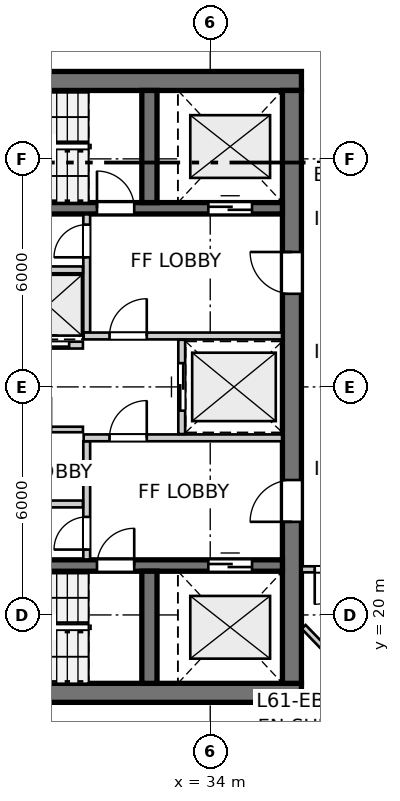
"""IFC4 building model, lengths in metres.
Left out: names, types, materials, properties, quantities, classifications, styles, units other than length and angle.
Written with IfcOpenShell. Run it as: python <this file> out.ifc"""

import sys

from ifc_helpers import new_model, si_unit, direction, frame, frame_2d, origin, place, context, subcontext, project, spatial, rectangle, extrude, source, transform, mapped, element, fill, save


model = new_model("IFC4")
c1 = context("Model", 3, precision=1e-05, world=origin(), true_north=direction((0.0, 1.0)))
c2 = subcontext(c1, "Body", "Model", "MODEL_VIEW")
j1 = project(units=[si_unit("LENGTHUNIT", "METRE"), si_unit("PLANEANGLEUNIT", "RADIAN")], contexts=[c1])
p1 = place(None, origin())
s1 = spatial("IfcSite", under=j1, at=p1, CompositionType="ELEMENT")
p2 = place(p1, origin())
s2 = spatial("IfcBuilding", under=s1, at=p2, CompositionType="ELEMENT")
p3 = place(p2, frame((0.0, 0.0, 205.2)))
s3 = spatial("IfcBuildingStorey", under=s2, at=p3, CompositionType="ELEMENT", Elevation=205.2)
for number, where, z_axis, x_axis in (
    (1, (24.3, 17.95, 0.0), (0.0, 0.0, 1.0), (1.0, 0.0, 0.0)),
    (2, (36.4, 34.05, 0.0), (0.0, 0.0, 1.0), (-1.0, 0.0, 0.0)),
):
    element("IfcWall", number, at=place(p3, frame(where, z_axis=z_axis, x_axis=x_axis)), inside=s3, PredefinedType="SHEAR", context=c2, shape_type="SweptSolid", body=[
        extrude(rectangle(XDim=12.1, YDim=0.5, at=frame_2d((6.05, 0.0))), origin(), (0.0, 0.0, 1.0), 2.935),
    ])
p4 = place(p3, frame((36.15, 18.2, 0.0), z_axis=(0.0, 0.0, 1.0), x_axis=(0.0, 1.0, 0.0)))
e3 = element("IfcWall", 3, at=p4, inside=s3, PredefinedType="SHEAR", context=c2, shape_type="SweptSolid", body=[
    extrude(rectangle(XDim=15.6, YDim=0.5, at=frame_2d((7.8, 0.0))), origin(), (0.0, 0.0, 1.0), 2.935),
])
p5 = place(p4, frame((4.25, 0.0, 0.0)))
e4 = element("IfcOpeningElement", 4, at=p5, cuts=e3, PredefinedType="OPENING", context=c2, shape_type="SweptSolid", body=[
    extrude(rectangle(XDim=1.1, YDim=2.15, at=frame_2d((0.55, 1.075))), frame((0.0, 0.26, 0.0), z_axis=(0.0, -1.0, 0.0), x_axis=(1.0, 0.0, 0.0)), (0.0, 0.0, 1.0), 0.52),
])
p6 = place(p4, frame((10.25, 0.0, 0.0)))
e5 = element("IfcOpeningElement", 5, at=p6, cuts=e3, PredefinedType="OPENING", context=c2, shape_type="SweptSolid", body=[
    extrude(rectangle(XDim=1.1, YDim=2.15, at=frame_2d((0.55, 1.075))), frame((0.0, 0.26, 0.0), z_axis=(0.0, -1.0, 0.0), x_axis=(1.0, 0.0, 0.0)), (0.0, 0.0, 1.0), 0.52),
])
p7 = place(p3, frame((24.8, 21.3, 0.0), z_axis=(0.0, 0.0, 1.0), x_axis=(1.0, 0.0, 0.0)))
e6 = element("IfcWall", 6, at=p7, inside=s3, PredefinedType="SHEAR", context=c2, shape_type="SweptSolid", body=[
    extrude(rectangle(XDim=11.1, YDim=0.3, at=frame_2d((5.55, 0.0))), origin(), (0.0, 0.0, 1.0), 2.935),
])
p8 = place(p7, frame((6.22, 0.0, 0.0)))
e7 = element("IfcOpeningElement", 7, at=p8, cuts=e6, PredefinedType="OPENING", context=c2, shape_type="SweptSolid", body=[
    extrude(rectangle(XDim=0.98, YDim=2.15, at=frame_2d((0.49, 1.075))), frame((0.0, 0.16, 0.0), z_axis=(0.0, -1.0, 0.0), x_axis=(1.0, 0.0, 0.0)), (0.0, 0.0, 1.0), 0.32),
])
p9 = place(p7, frame((9.15, 0.0, 0.0)))
e8 = element("IfcOpeningElement", 8, at=p9, cuts=e6, PredefinedType="OPENING", context=c2, shape_type="SweptSolid", body=[
    extrude(rectangle(XDim=1.15, YDim=2.15, at=frame_2d((0.575, 1.075))), frame((0.0, 0.16, 0.0), z_axis=(0.0, -1.0, 0.0), x_axis=(1.0, 0.0, 0.0)), (0.0, 0.0, 1.0), 0.32),
])
p10 = place(p3, frame((32.4, 18.2, 0.0), z_axis=(0.0, 0.0, 1.0), x_axis=(0.0, 1.0, 0.0)))
e9 = element("IfcWall", 9, at=p10, inside=s3, PredefinedType="SHEAR", context=c2, shape_type="SweptSolid", body=[
    extrude(rectangle(XDim=2.95, YDim=0.4, at=frame_2d((1.475, 0.0))), origin(), (0.0, 0.0, 1.0), 2.935),
])
p11 = place(p3, frame((24.8, 30.7, 0.0), z_axis=(0.0, 0.0, 1.0), x_axis=(1.0, 0.0, 0.0)))
e10 = element("IfcWall", 10, at=p11, inside=s3, PredefinedType="SHEAR", context=c2, shape_type="SweptSolid", body=[
    extrude(rectangle(XDim=11.1, YDim=0.3, at=frame_2d((5.55, 0.0))), origin(), (0.0, 0.0, 1.0), 2.935),
])
p12 = place(p11, frame((6.22, 0.0, 0.0)))
e11 = element("IfcOpeningElement", 11, at=p12, cuts=e10, PredefinedType="OPENING", context=c2, shape_type="SweptSolid", body=[
    extrude(rectangle(XDim=0.98, YDim=2.15, at=frame_2d((0.49, 1.075))), frame((0.0, 0.16, 0.0), z_axis=(0.0, -1.0, 0.0), x_axis=(1.0, 0.0, 0.0)), (0.0, 0.0, 1.0), 0.32),
])
p13 = place(p11, frame((9.15, 0.0, 0.0)))
e12 = element("IfcOpeningElement", 12, at=p13, cuts=e10, PredefinedType="OPENING", context=c2, shape_type="SweptSolid", body=[
    extrude(rectangle(XDim=1.15, YDim=2.15, at=frame_2d((0.575, 1.075))), frame((0.0, 0.16, 0.0), z_axis=(0.0, -1.0, 0.0), x_axis=(1.0, 0.0, 0.0)), (0.0, 0.0, 1.0), 0.32),
])
p14 = place(p3, frame((32.4, 30.85, 0.0), z_axis=(0.0, 0.0, 1.0), x_axis=(0.0, 1.0, 0.0)))
e13 = element("IfcWall", 13, at=p14, inside=s3, PredefinedType="SHEAR", context=c2, shape_type="SweptSolid", body=[
    extrude(rectangle(XDim=2.95, YDim=0.4, at=frame_2d((1.475, 0.0))), origin(), (0.0, 0.0, 1.0), 2.935),
])
p15 = place(p3, frame((30.75, 21.46, 0.0), z_axis=(0.0, 0.0, 1.0), x_axis=(0.0, 1.0, 0.0)))
e14 = element("IfcWall", 14, at=p15, inside=s3, PredefinedType="PARTITIONING", context=c2, shape_type="SweptSolid", body=[
    extrude(rectangle(XDim=3.11, YDim=0.18, at=frame_2d((1.555, 0.0))), origin(), (0.0, 0.0, 1.0), 2.935),
])
p16 = place(p15, frame((0.26, 0.0, 0.0)))
e15 = element("IfcOpeningElement", 15, at=p16, cuts=e14, PredefinedType="OPENING", context=c2, shape_type="SweptSolid", body=[
    extrude(rectangle(XDim=0.86, YDim=2.05, at=frame_2d((0.43, 1.025))), frame((0.0, 0.1, 0.0), z_axis=(0.0, -1.0, 0.0), x_axis=(1.0, 0.0, 0.0)), (0.0, 0.0, 1.0), 0.2),
])
p17 = place(p3, frame((30.67, 24.66, 0.0), z_axis=(0.0, 0.0, 1.0), x_axis=(1.0, 0.0, 0.0)))
e16 = element("IfcWall", 16, at=p17, inside=s3, PredefinedType="PARTITIONING", context=c2, shape_type="SweptSolid", body=[
    extrude(rectangle(XDim=5.22, YDim=0.18, at=frame_2d((2.61, 0.0))), origin(), (0.0, 0.0, 1.0), 2.935),
])
p18 = place(p17, frame((0.68, 0.0, 0.0)))
e17 = element("IfcOpeningElement", 17, at=p18, cuts=e16, PredefinedType="OPENING", context=c2, shape_type="SweptSolid", body=[
    extrude(rectangle(XDim=0.98, YDim=2.15, at=frame_2d((0.49, 1.075))), frame((0.0, 0.1, 0.0), z_axis=(0.0, -1.0, 0.0), x_axis=(1.0, 0.0, 0.0)), (0.0, 0.0, 1.0), 0.2),
])
p19 = place(p3, frame((30.75, 27.43, 0.0), z_axis=(0.0, 0.0, 1.0), x_axis=(0.0, 1.0, 0.0)))
e18 = element("IfcWall", 18, at=p19, inside=s3, PredefinedType="PARTITIONING", context=c2, shape_type="SweptSolid", body=[
    extrude(rectangle(XDim=3.11, YDim=0.18, at=frame_2d((1.555, 0.0))), origin(), (0.0, 0.0, 1.0), 2.935),
])
p20 = place(p19, frame((1.98, 0.0, 0.0)))
e19 = element("IfcOpeningElement", 19, at=p20, cuts=e18, PredefinedType="OPENING", context=c2, shape_type="SweptSolid", body=[
    extrude(rectangle(XDim=0.86, YDim=2.05, at=frame_2d((0.43, 1.025))), frame((0.0, 0.1, 0.0), z_axis=(0.0, -1.0, 0.0), x_axis=(1.0, 0.0, 0.0)), (0.0, 0.0, 1.0), 0.2),
])
p21 = place(p3, frame((30.67, 27.34, 0.0), z_axis=(0.0, 0.0, 1.0), x_axis=(1.0, 0.0, 0.0)))
e20 = element("IfcWall", 20, at=p21, inside=s3, PredefinedType="PARTITIONING", context=c2, shape_type="SweptSolid", body=[
    extrude(rectangle(XDim=5.22, YDim=0.18, at=frame_2d((2.61, 0.0))), origin(), (0.0, 0.0, 1.0), 2.935),
])
p22 = place(p21, frame((0.68, 0.0, 0.0)))
e21 = element("IfcOpeningElement", 21, at=p22, cuts=e20, PredefinedType="OPENING", context=c2, shape_type="SweptSolid", body=[
    extrude(rectangle(XDim=0.98, YDim=2.15, at=frame_2d((0.49, 1.075))), frame((0.0, 0.1, 0.0), z_axis=(0.0, -1.0, 0.0), x_axis=(1.0, 0.0, 0.0)), (0.0, 0.0, 1.0), 0.2),
])
p23 = place(p3, frame((33.25, 24.76, 0.0), z_axis=(0.0, 0.0, 1.0), x_axis=(0.0, 1.0, 0.0)))
e22 = element("IfcWall", 22, at=p23, inside=s3, PredefinedType="PARTITIONING", context=c2, shape_type="SweptSolid", body=[
    extrude(rectangle(XDim=2.48, YDim=0.18, at=frame_2d((1.24, 0.0))), origin(), (0.0, 0.0, 1.0), 2.935),
])
p24 = place(p23, frame((0.615, 0.0, 0.0)))
e23 = element("IfcOpeningElement", 23, at=p24, cuts=e22, PredefinedType="OPENING", context=c2, shape_type="SweptSolid", body=[
    extrude(rectangle(XDim=1.25, YDim=2.15, at=frame_2d((0.625, 1.075))), frame((0.0, 0.1, 0.0), z_axis=(0.0, -1.0, 0.0), x_axis=(1.0, 0.0, 0.0)), (0.0, 0.0, 1.0), 0.2),
])
p25 = place(p3, frame((24.81, 22.92, 0.0), z_axis=(0.0, 0.0, 1.0), x_axis=(1.0, 0.0, 0.0)))
e24 = element("IfcWall", 24, at=p25, inside=s3, PredefinedType="PARTITIONING", context=c2, shape_type="SweptSolid", body=[
    extrude(rectangle(XDim=5.84, YDim=0.18, at=frame_2d((2.92, 0.0))), origin(), (0.0, 0.0, 1.0), 2.935),
])
p26 = place(p3, frame((28.13, 24.88, 0.0), z_axis=(0.0, 0.0, 1.0), x_axis=(1.0, 0.0, 0.0)))
e25 = element("IfcWall", 25, at=p26, inside=s3, PredefinedType="PARTITIONING", context=c2, shape_type="SweptSolid", body=[
    extrude(rectangle(XDim=2.52, YDim=0.145, at=frame_2d((1.26, 0.0))), origin(), (0.0, 0.0, 1.0), 2.935),
])
p27 = place(p26, frame((0.82, 0.0, 0.0)))
e26 = element("IfcOpeningElement", 26, at=p27, cuts=e25, PredefinedType="OPENING", context=c2, shape_type="SweptSolid", body=[
    extrude(rectangle(XDim=0.86, YDim=2.05, at=frame_2d((0.43, 1.025))), frame((0.0, 0.083, 0.0), z_axis=(0.0, -1.0, 0.0), x_axis=(1.0, 0.0, 0.0)), (0.0, 0.0, 1.0), 0.165),
])
p28 = place(p3, frame((24.81, 29.08, 0.0), z_axis=(0.0, 0.0, 1.0), x_axis=(1.0, 0.0, 0.0)))
e27 = element("IfcWall", 27, at=p28, inside=s3, PredefinedType="PARTITIONING", context=c2, shape_type="SweptSolid", body=[
    extrude(rectangle(XDim=5.84, YDim=0.18, at=frame_2d((2.92, 0.0))), origin(), (0.0, 0.0, 1.0), 2.935),
])
p29 = place(p3, frame((28.825, 27.1, 0.0), z_axis=(0.0, 0.0, 1.0), x_axis=(1.0, 0.0, 0.0)))
e28 = element("IfcWall", 28, at=p29, inside=s3, PredefinedType="PARTITIONING", context=c2, shape_type="SweptSolid", body=[
    extrude(rectangle(XDim=1.825, YDim=0.18, at=frame_2d((0.913, 0.0))), origin(), (0.0, 0.0, 1.0), 2.935),
])
p30 = place(p29, frame((0.363, 0.0, 0.0)))
e29 = element("IfcOpeningElement", 29, at=p30, cuts=e28, PredefinedType="OPENING", context=c2, shape_type="SweptSolid", body=[
    extrude(rectangle(XDim=1.1, YDim=2.15, at=frame_2d((0.55, 1.075))), frame((0.0, 0.1, 0.0), z_axis=(0.0, -1.0, 0.0), x_axis=(1.0, 0.0, 0.0)), (0.0, 0.0, 1.0), 0.2),
])
p31 = place(p3, frame((38.02, 21.2, 0.0), z_axis=(0.0, 0.0, 1.0), x_axis=(-1.0, 0.0, 0.0)))
e30 = element("IfcWall", 30, at=p31, inside=s3, PredefinedType="PARTITIONING", context=c2, shape_type="SweptSolid", body=[
    extrude(rectangle(XDim=1.612, YDim=0.16, at=frame_2d((0.806, 0.0))), origin(), (0.0, 0.0, 1.0), 2.935),
])
p32 = place(p31, frame((0.35, 0.0, 0.0)))
e31 = element("IfcOpeningElement", 31, at=p32, cuts=e30, PredefinedType="OPENING", context=c2, shape_type="SweptSolid", body=[
    extrude(rectangle(XDim=0.92, YDim=2.1, at=frame_2d((0.46, 1.05))), frame((0.0, 0.09, 0.0), z_axis=(0.0, -1.0, 0.0), x_axis=(1.0, 0.0, 0.0)), (0.0, 0.0, 1.0), 0.18),
])
p33 = place(p3, frame((36.458, 19.686, 0.0), z_axis=(0.0, 0.0, 1.0), x_axis=(0.695231916786, -0.718785490868, 0.0)))
e32 = element("IfcWall", 32, at=p33, inside=s3, PredefinedType="PARTITIONING", context=c2, shape_type="SweptSolid", body=[
    extrude(rectangle(XDim=1.824, YDim=0.145, at=frame_2d((0.912, 0.0))), origin(), (0.0, 0.0, 1.0), 2.935),
])
m1 = source(origin(), c2, "Body", "SweptSolid", [
    extrude(rectangle(XDim=0.98, YDim=2.15, at=frame_2d((0.49, 1.075))), frame((0.0, 0.025, 0.0), z_axis=(0.0, -1.0, 0.0), x_axis=(1.0, 0.0, 0.0)), (0.0, 0.0, 1.0), 0.05),
])
p34 = place(p8, origin())
e33 = element("IfcDoor", 33, at=p34, inside=s3, OperationType="SINGLE_SWING_RIGHT", PredefinedType="DOOR", context=c2, shape_type="MappedRepresentation", body=[
    mapped(m1, transform((0.0, 0.0, 0.0), x_axis=(1.0, 0.0, 0.0), y_axis=(0.0, 1.0, 0.0), z_axis=(0.0, 0.0, 1.0), scale=1.0)),
])
fill(e7, e33)
m2 = source(origin(), c2, "Body", "SweptSolid", [
    extrude(rectangle(XDim=1.15, YDim=2.15, at=frame_2d((0.575, 1.075))), frame((0.0, 0.025, 0.0), z_axis=(0.0, -1.0, 0.0), x_axis=(1.0, 0.0, 0.0)), (0.0, 0.0, 1.0), 0.05),
])
p35 = place(p9, origin())
e34 = element("IfcDoor", 34, at=p35, inside=s3, OperationType="DOUBLE_DOOR_SLIDING", PredefinedType="DOOR", context=c2, shape_type="MappedRepresentation", body=[
    mapped(m2, transform((0.0, 0.0, 0.0), x_axis=(1.0, 0.0, 0.0), y_axis=(0.0, 1.0, 0.0), z_axis=(0.0, 0.0, 1.0), scale=1.0)),
])
fill(e8, e34)
p36 = place(p12, origin())
e35 = element("IfcDoor", 35, at=p36, inside=s3, OperationType="SINGLE_SWING_LEFT", PredefinedType="DOOR", context=c2, shape_type="MappedRepresentation", body=[
    mapped(m1, transform((0.0, 0.0, 0.0), x_axis=(1.0, 0.0, 0.0), y_axis=(0.0, 1.0, 0.0), z_axis=(0.0, 0.0, 1.0), scale=1.0)),
])
fill(e11, e35)
p37 = place(p13, origin())
e36 = element("IfcDoor", 36, at=p37, inside=s3, OperationType="DOUBLE_DOOR_SLIDING", PredefinedType="DOOR", context=c2, shape_type="MappedRepresentation", body=[
    mapped(m2, transform((0.0, 0.0, 0.0), x_axis=(1.0, 0.0, 0.0), y_axis=(0.0, 1.0, 0.0), z_axis=(0.0, 0.0, 1.0), scale=1.0)),
])
fill(e12, e36)
m3 = source(origin(), c2, "Body", "SweptSolid", [
    extrude(rectangle(XDim=1.1, YDim=2.15, at=frame_2d((0.55, 1.075))), frame((0.0, 0.025, 0.0), z_axis=(0.0, -1.0, 0.0), x_axis=(1.0, 0.0, 0.0)), (0.0, 0.0, 1.0), 0.05),
])
p38 = place(p5, origin())
e37 = element("IfcDoor", 37, at=p38, inside=s3, OperationType="SINGLE_SWING_LEFT", PredefinedType="DOOR", context=c2, shape_type="MappedRepresentation", body=[
    mapped(m3, transform((0.0, 0.0, 0.0), x_axis=(1.0, 0.0, 0.0), y_axis=(0.0, 1.0, 0.0), z_axis=(0.0, 0.0, 1.0), scale=1.0)),
])
fill(e4, e37)
p39 = place(p6, origin())
e38 = element("IfcDoor", 38, at=p39, inside=s3, OperationType="SINGLE_SWING_RIGHT", PredefinedType="DOOR", context=c2, shape_type="MappedRepresentation", body=[
    mapped(m3, transform((0.0, 0.0, 0.0), x_axis=(1.0, 0.0, 0.0), y_axis=(0.0, 1.0, 0.0), z_axis=(0.0, 0.0, 1.0), scale=1.0)),
])
fill(e5, e38)
m4 = source(origin(), c2, "Body", "SweptSolid", [
    extrude(rectangle(XDim=0.86, YDim=2.05, at=frame_2d((0.43, 1.025))), frame((0.0, 0.025, 0.0), z_axis=(0.0, -1.0, 0.0), x_axis=(1.0, 0.0, 0.0)), (0.0, 0.0, 1.0), 0.05),
])
p40 = place(p16, origin())
e39 = element("IfcDoor", 39, at=p40, inside=s3, OperationType="SINGLE_SWING_LEFT", PredefinedType="DOOR", context=c2, shape_type="MappedRepresentation", body=[
    mapped(m4, transform((0.0, 0.0, 0.0), x_axis=(1.0, 0.0, 0.0), y_axis=(0.0, 1.0, 0.0), z_axis=(0.0, 0.0, 1.0), scale=1.0)),
])
fill(e15, e39)
p41 = place(p18, origin())
e40 = element("IfcDoor", 40, at=p41, inside=s3, OperationType="SINGLE_SWING_RIGHT", PredefinedType="DOOR", context=c2, shape_type="MappedRepresentation", body=[
    mapped(m1, transform((0.0, 0.0, 0.0), x_axis=(1.0, 0.0, 0.0), y_axis=(0.0, 1.0, 0.0), z_axis=(0.0, 0.0, 1.0), scale=1.0)),
])
fill(e17, e40)
p42 = place(p20, origin())
e41 = element("IfcDoor", 41, at=p42, inside=s3, OperationType="SINGLE_SWING_LEFT", PredefinedType="DOOR", context=c2, shape_type="MappedRepresentation", body=[
    mapped(m4, transform((0.0, 0.0, 0.0), x_axis=(1.0, 0.0, 0.0), y_axis=(0.0, 1.0, 0.0), z_axis=(0.0, 0.0, 1.0), scale=1.0)),
])
fill(e19, e41)
p43 = place(p22, origin())
e42 = element("IfcDoor", 42, at=p43, inside=s3, OperationType="SINGLE_SWING_RIGHT", PredefinedType="DOOR", context=c2, shape_type="MappedRepresentation", body=[
    mapped(m1, transform((0.0, 0.0, 0.0), x_axis=(1.0, 0.0, 0.0), y_axis=(0.0, 1.0, 0.0), z_axis=(0.0, 0.0, 1.0), scale=1.0)),
])
fill(e21, e42)
m5 = source(origin(), c2, "Body", "SweptSolid", [
    extrude(rectangle(XDim=1.25, YDim=2.15, at=frame_2d((0.625, 1.075))), frame((0.0, 0.025, 0.0), z_axis=(0.0, -1.0, 0.0), x_axis=(1.0, 0.0, 0.0)), (0.0, 0.0, 1.0), 0.05),
])
p44 = place(p24, origin())
e43 = element("IfcDoor", 43, at=p44, inside=s3, OperationType="DOUBLE_DOOR_SLIDING", PredefinedType="DOOR", context=c2, shape_type="MappedRepresentation", body=[
    mapped(m5, transform((0.0, 0.0, 0.0), x_axis=(1.0, 0.0, 0.0), y_axis=(0.0, 1.0, 0.0), z_axis=(0.0, 0.0, 1.0), scale=1.0)),
])
fill(e23, e43)
p45 = place(p30, origin())
e44 = element("IfcDoor", 44, at=p45, inside=s3, OperationType="DOUBLE_DOOR_SLIDING", PredefinedType="DOOR", context=c2, shape_type="MappedRepresentation", body=[
    mapped(m3, transform((0.0, 0.0, 0.0), x_axis=(1.0, 0.0, 0.0), y_axis=(0.0, 1.0, 0.0), z_axis=(0.0, 0.0, 1.0), scale=1.0)),
])
fill(e29, e44)
m6 = source(origin(), c2, "Body", "SweptSolid", [
    extrude(rectangle(XDim=0.92, YDim=2.1, at=frame_2d((0.46, 1.05))), frame((0.0, 0.025, 0.0), z_axis=(0.0, -1.0, 0.0), x_axis=(1.0, 0.0, 0.0)), (0.0, 0.0, 1.0), 0.05),
])
p46 = place(p32, origin())
e45 = element("IfcDoor", 45, at=p46, inside=s3, OperationType="SINGLE_SWING_RIGHT", PredefinedType="DOOR", context=c2, shape_type="MappedRepresentation", body=[
    mapped(m6, transform((0.0, 0.0, 0.0), x_axis=(1.0, 0.0, 0.0), y_axis=(0.0, 1.0, 0.0), z_axis=(0.0, 0.0, 1.0), scale=1.0)),
])
fill(e31, e45)
save(model, sys.argv[1])
